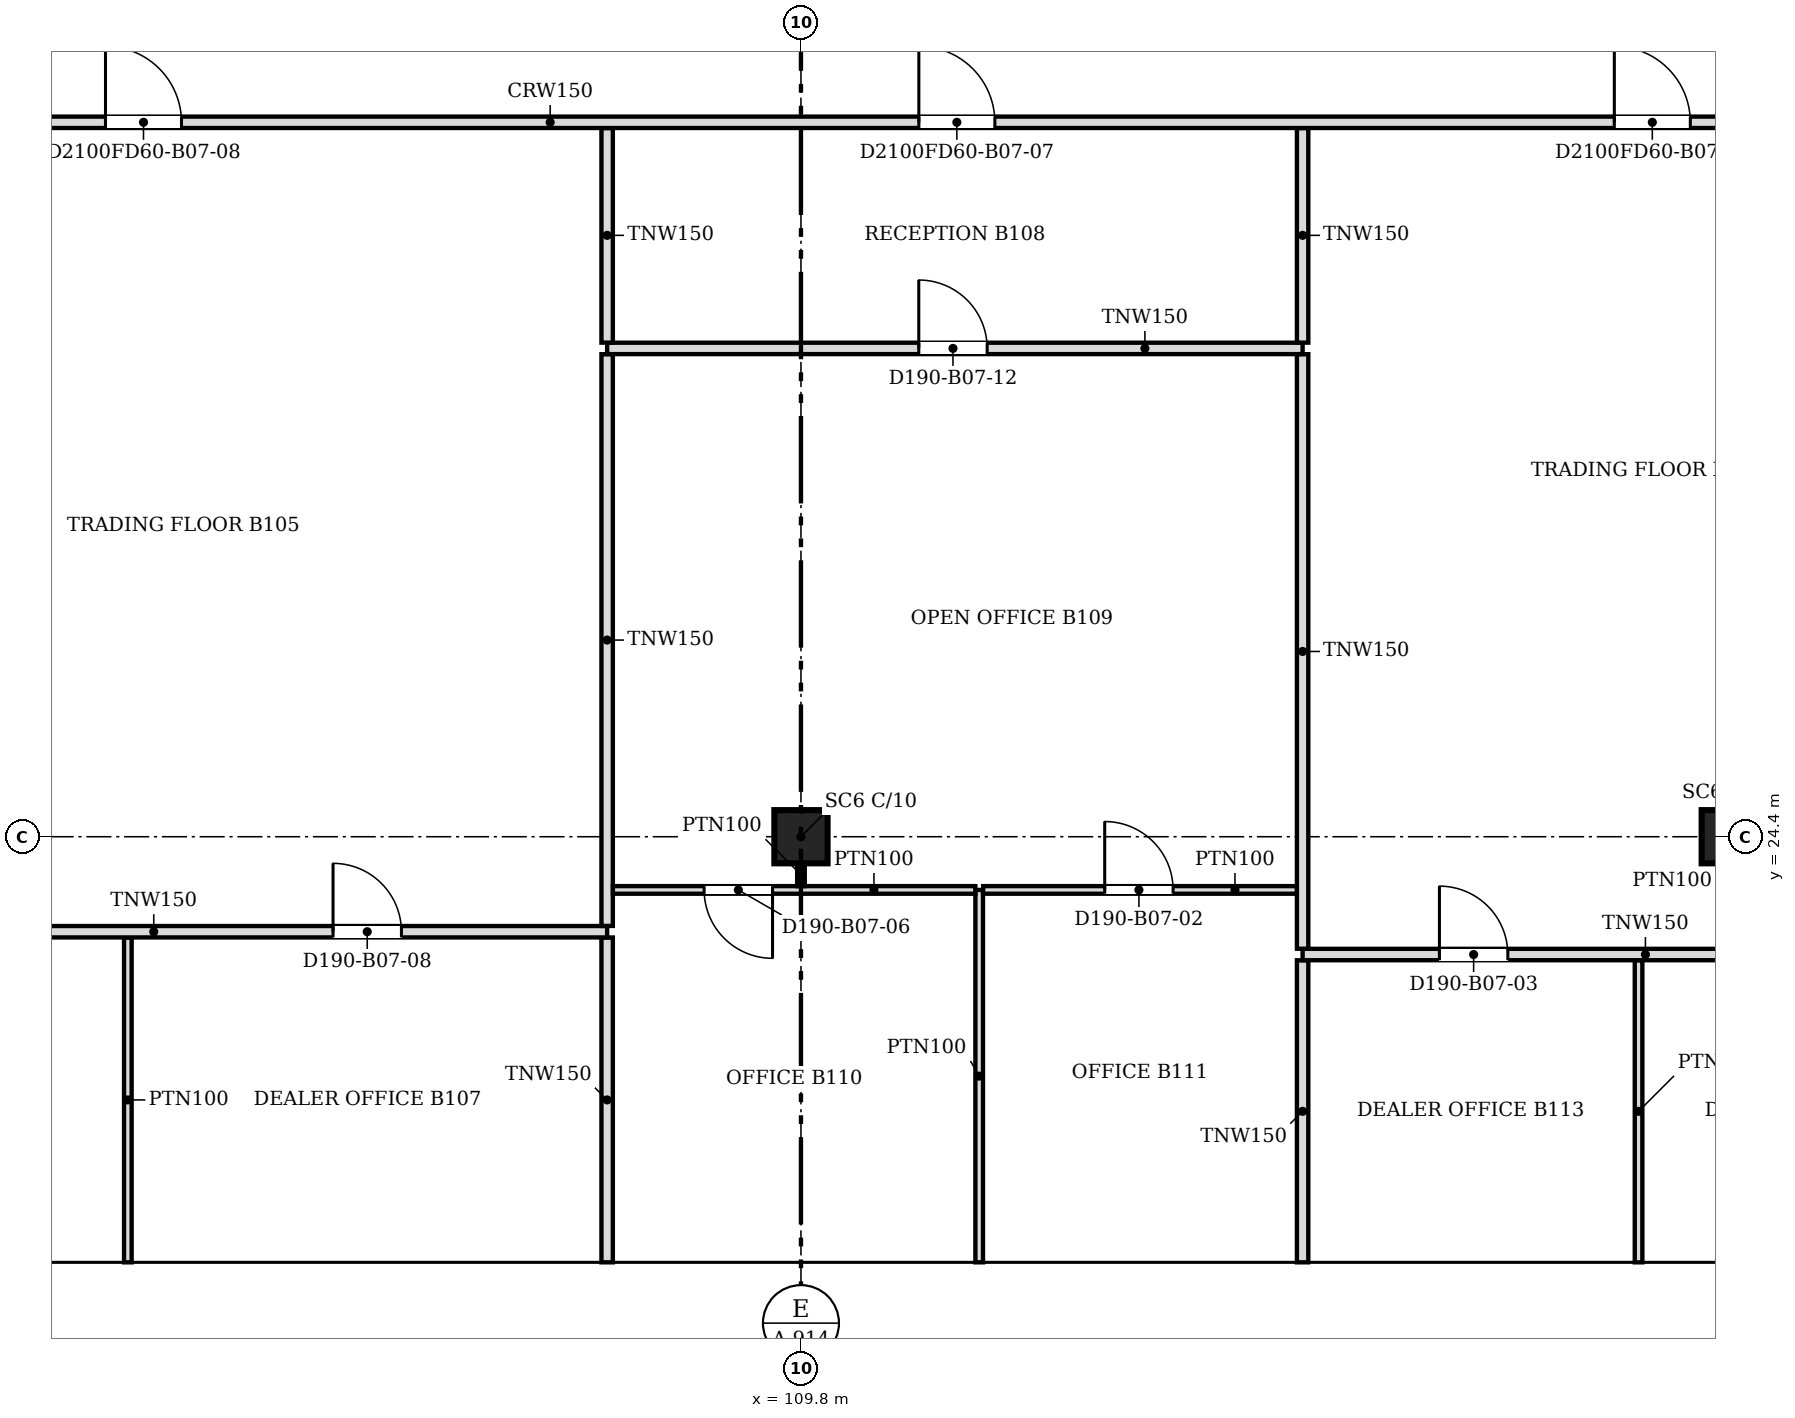
"""IFC4 building model, lengths in metres.
Left out: names, types, materials, properties, quantities, classifications, styles, units other than length and angle.
Written with IfcOpenShell. Run it as: python <this file> out.ifc"""

import sys

from ifc_helpers import new_model, si_unit, direction, frame, frame_2d, origin, origin_2d, place, context, subcontext, project, spatial, polyline, rectangle, outline, extrude, faceted_brep, source, transform, mapped, element, fill, save


model = new_model("IFC4")
c1 = context("Model", 3, precision=1e-05, world=origin(), true_north=direction((0.0, 1.0)))
c2 = subcontext(c1, "Body", "Model", "MODEL_VIEW")
j1 = project(units=[si_unit("LENGTHUNIT", "METRE"), si_unit("PLANEANGLEUNIT", "RADIAN")], contexts=[c1])
p1 = place(None, origin())
s1 = spatial("IfcSite", under=j1, at=p1, CompositionType="ELEMENT")
p2 = place(p1, origin())
s2 = spatial("IfcBuilding", under=s1, at=p2, CompositionType="ELEMENT")
p3 = place(p2, frame((0.0, 0.0, 72.4)))
s3 = spatial("IfcBuildingStorey", under=s2, at=p3, CompositionType="ELEMENT", Elevation=72.4)
for number, where, z_axis, x_axis in (
    (1, (109.8, 24.4, 0.0), (0.0, 0.0, 1.0), (1.0, 0.0, 0.0)),
    (2, (122.0, 24.4, 0.0), (0.0, 0.0, 1.0), (1.0, 0.0, 0.0)),
):
    element("IfcColumn", number, at=place(p3, frame(where, z_axis=z_axis, x_axis=x_axis)), inside=s3, PredefinedType="COLUMN", context=c2, shape_type="SweptSolid", body=[
        extrude(rectangle(XDim=0.7, YDim=0.7, at=origin_2d()), origin(), (0.0, 0.0, 1.0), 3.6),
    ])
m1 = source(origin(), c2, "Body", "Brep", [
    faceted_brep([(3.05, -0.25, 0.0), (6.1, -0.25, 3.8), (6.1, -0.25, 3.8), (3.05, -0.25, 7.6), (0.0, -0.25, 3.8), (0.0, 0.25, 3.8), (3.05, 0.25, 7.6), (6.1, 0.25, 3.8), (6.1, 0.25, 3.8), (3.05, 0.25, 0.0)], [[[0, 1, 2, 3, 4]], [[5, 6, 7, 8, 9]], [[9, 8, 1, 0]], [[7, 6, 3, 2]], [[6, 5, 4, 3]], [[5, 9, 0, 4]], [[1, 8, 7, 2]]]),
])
p4 = place(p3, frame((97.6, 18.55, -3.8), z_axis=(0.0, 0.0, 1.0), x_axis=(1.0, 0.0, 0.0)))
e3 = element("IfcWall", 3, at=p4, inside=s3, PredefinedType="SOLIDWALL", context=c2, shape_type="MappedRepresentation", body=[
    mapped(m1, transform((0.0, 0.0, 0.0), scale=1.0)),
])
m2 = source(origin(), c2, "Body", "SweptSolid", [
    extrude(outline(polyline([(3.05, 0.399), (5.78, 3.8), (3.05, 7.2), (0.321, 3.8), (3.05, 0.399)])), frame((0.0, 0.26, 0.0), z_axis=(0.0, -1.0, 0.0), x_axis=(1.0, 0.0, 0.0)), (0.0, 0.0, 1.0), 0.52),
])
p5 = place(p4, origin())
e4 = element("IfcOpeningElement", 4, at=p5, cuts=e3, PredefinedType="OPENING", context=c2, shape_type="MappedRepresentation", body=[
    mapped(m2, transform((0.0, 0.0, 0.0), scale=1.0)),
])
m3 = source(origin(), c2, "Body", "SweptSolid", [
    extrude(outline(polyline([(3.05, 0.0), (6.1, 3.8), (3.05, 7.6), (0.0, 3.8), (3.05, 0.0)])), frame((0.0, 0.25, 0.0), z_axis=(0.0, -1.0, 0.0), x_axis=(1.0, 0.0, 0.0)), (0.0, 0.0, 1.0), 0.5),
])
p6 = place(p3, frame((103.7, 18.55, -3.8), z_axis=(0.0, 0.0, 1.0), x_axis=(1.0, 0.0, 0.0)))
e5 = element("IfcWall", 5, at=p6, inside=s3, PredefinedType="SOLIDWALL", context=c2, shape_type="MappedRepresentation", body=[
    mapped(m3, transform((0.0, 0.0, 0.0), scale=1.0)),
])
p7 = place(p6, origin())
e6 = element("IfcOpeningElement", 6, at=p7, cuts=e5, PredefinedType="OPENING", context=c2, shape_type="MappedRepresentation", body=[
    mapped(m2, transform((0.0, 0.0, 0.0), scale=1.0)),
])
p8 = place(p3, frame((109.8, 18.55, -3.8), z_axis=(0.0, 0.0, 1.0), x_axis=(1.0, 0.0, 0.0)))
e7 = element("IfcWall", 7, at=p8, inside=s3, PredefinedType="SOLIDWALL", context=c2, shape_type="MappedRepresentation", body=[
    mapped(m1, transform((0.0, 0.0, 0.0), scale=1.0)),
])
p9 = place(p8, origin())
e8 = element("IfcOpeningElement", 8, at=p9, cuts=e7, PredefinedType="OPENING", context=c2, shape_type="MappedRepresentation", body=[
    mapped(m2, transform((0.0, 0.0, 0.0), scale=1.0)),
])
p10 = place(p3, frame((115.9, 18.55, -3.8), z_axis=(0.0, 0.0, 1.0), x_axis=(1.0, 0.0, 0.0)))
e9 = element("IfcWall", 9, at=p10, inside=s3, PredefinedType="SOLIDWALL", context=c2, shape_type="MappedRepresentation", body=[
    mapped(m3, transform((0.0, 0.0, 0.0), scale=1.0)),
])
p11 = place(p10, origin())
e10 = element("IfcOpeningElement", 10, at=p11, cuts=e9, PredefinedType="OPENING", context=c2, shape_type="MappedRepresentation", body=[
    mapped(m2, transform((0.0, 0.0, 0.0), scale=1.0)),
])
p12 = place(p2, frame((0.0, 0.0, 76.2)))
s4 = spatial("IfcBuildingStorey", under=s2, at=p12, CompositionType="ELEMENT", Elevation=76.2)
m4 = source(origin(), c2, "Body", "Brep", [
    faceted_brep([(3.05, -0.25, 0.0), (6.1, -0.25, 3.8), (6.1, -0.25, 3.8), (3.05, -0.25, 7.6), (0.0, -0.25, 3.8), (0.0, 0.25, 3.8), (3.05, 0.25, 7.6), (6.1, 0.25, 3.8), (6.1, 0.25, 3.8), (3.05, 0.25, 0.0)], [[[0, 1, 2, 3, 4]], [[5, 6, 7, 8, 9]], [[9, 8, 1, 0]], [[7, 6, 3, 2]], [[6, 5, 4, 3]], [[5, 9, 0, 4]], [[1, 8, 7, 2]]]),
])
p13 = place(p12, frame((94.55, 18.55, -3.8), z_axis=(0.0, 0.0, 1.0), x_axis=(1.0, 0.0, 0.0)))
e11 = element("IfcWall", 11, at=p13, inside=s4, PredefinedType="SOLIDWALL", context=c2, shape_type="MappedRepresentation", body=[
    mapped(m4, transform((0.0, 0.0, 0.0), scale=1.0)),
])
m5 = source(origin(), c2, "Body", "SweptSolid", [
    extrude(outline(polyline([(3.05, 0.399), (5.78, 3.8), (3.05, 7.201), (0.321, 3.8), (3.05, 0.399)])), frame((0.0, 0.26, 0.0), z_axis=(0.0, -1.0, 0.0), x_axis=(1.0, 0.0, 0.0)), (0.0, 0.0, 1.0), 0.52),
])
p14 = place(p13, origin())
e12 = element("IfcOpeningElement", 12, at=p14, cuts=e11, PredefinedType="OPENING", context=c2, shape_type="MappedRepresentation", body=[
    mapped(m5, transform((0.0, 0.0, 0.0), scale=1.0)),
])
m6 = source(origin(), c2, "Body", "SweptSolid", [
    extrude(outline(polyline([(3.05, 0.0), (6.1, 3.8), (3.05, 7.6), (0.0, 3.8), (3.05, 0.0)])), frame((0.0, 0.25, 0.0), z_axis=(0.0, -1.0, 0.0), x_axis=(1.0, 0.0, 0.0)), (0.0, 0.0, 1.0), 0.5),
])
p15 = place(p12, frame((100.65, 18.55, -3.8), z_axis=(0.0, 0.0, 1.0), x_axis=(1.0, 0.0, 0.0)))
e13 = element("IfcWall", 13, at=p15, inside=s4, PredefinedType="SOLIDWALL", context=c2, shape_type="MappedRepresentation", body=[
    mapped(m6, transform((0.0, 0.0, 0.0), scale=1.0)),
])
p16 = place(p15, origin())
e14 = element("IfcOpeningElement", 14, at=p16, cuts=e13, PredefinedType="OPENING", context=c2, shape_type="MappedRepresentation", body=[
    mapped(m5, transform((0.0, 0.0, 0.0), scale=1.0)),
])
p17 = place(p12, frame((106.75, 18.55, -3.8), z_axis=(0.0, 0.0, 1.0), x_axis=(1.0, 0.0, 0.0)))
e15 = element("IfcWall", 15, at=p17, inside=s4, PredefinedType="SOLIDWALL", context=c2, shape_type="MappedRepresentation", body=[
    mapped(m6, transform((0.0, 0.0, 0.0), scale=1.0)),
])
p18 = place(p17, origin())
e16 = element("IfcOpeningElement", 16, at=p18, cuts=e15, PredefinedType="OPENING", context=c2, shape_type="MappedRepresentation", body=[
    mapped(m5, transform((0.0, 0.0, 0.0), scale=1.0)),
])
p19 = place(p12, frame((112.85, 18.55, -3.8), z_axis=(0.0, 0.0, 1.0), x_axis=(1.0, 0.0, 0.0)))
e17 = element("IfcWall", 17, at=p19, inside=s4, PredefinedType="SOLIDWALL", context=c2, shape_type="MappedRepresentation", body=[
    mapped(m4, transform((0.0, 0.0, 0.0), scale=1.0)),
])
p20 = place(p19, origin())
e18 = element("IfcOpeningElement", 18, at=p20, cuts=e17, PredefinedType="OPENING", context=c2, shape_type="MappedRepresentation", body=[
    mapped(m5, transform((0.0, 0.0, 0.0), scale=1.0)),
])
p21 = place(p12, frame((118.95, 18.55, -3.8), z_axis=(0.0, 0.0, 1.0), x_axis=(1.0, 0.0, 0.0)))
e19 = element("IfcWall", 19, at=p21, inside=s4, PredefinedType="SOLIDWALL", context=c2, shape_type="MappedRepresentation", body=[
    mapped(m6, transform((0.0, 0.0, 0.0), scale=1.0)),
])
p22 = place(p21, origin())
e20 = element("IfcOpeningElement", 20, at=p22, cuts=e19, PredefinedType="OPENING", context=c2, shape_type="MappedRepresentation", body=[
    mapped(m5, transform((0.0, 0.0, 0.0), scale=1.0)),
])
p23 = place(p3, frame((100.944, 18.8, 0.0), z_axis=(0.0, 0.0, 1.0), x_axis=(0.0, 1.0, 0.0)))
e21 = element("IfcWall", 21, at=p23, inside=s3, PredefinedType="PARTITIONING", context=c2, shape_type="SweptSolid", body=[
    extrude(rectangle(XDim=4.274, YDim=0.1, at=frame_2d((2.137, 0.0))), origin(), (0.0, 0.0, 1.0), 3.067),
])
p24 = place(p3, frame((107.25, 18.8, 0.0), z_axis=(0.0, 0.0, 1.0), x_axis=(0.0, 1.0, 0.0)))
e22 = element("IfcWall", 22, at=p24, inside=s3, PredefinedType="PARTITIONING", context=c2, shape_type="SweptSolid", body=[
    extrude(rectangle(XDim=4.274, YDim=0.15, at=frame_2d((2.137, 0.0))), origin(), (0.0, 0.0, 1.0), 3.067),
])
p25 = place(p3, frame((112.145, 18.8, 0.0), z_axis=(0.0, 0.0, 1.0), x_axis=(0.0, 1.0, 0.0)))
e23 = element("IfcWall", 23, at=p25, inside=s3, PredefinedType="PARTITIONING", context=c2, shape_type="SweptSolid", body=[
    extrude(rectangle(XDim=4.9, YDim=0.1, at=frame_2d((2.45, 0.0))), origin(), (0.0, 0.0, 1.0), 3.067),
])
p26 = place(p3, frame((116.4, 18.8, 0.0), z_axis=(0.0, 0.0, 1.0), x_axis=(0.0, 1.0, 0.0)))
e24 = element("IfcWall", 24, at=p26, inside=s3, PredefinedType="PARTITIONING", context=c2, shape_type="SweptSolid", body=[
    extrude(rectangle(XDim=3.974, YDim=0.15, at=frame_2d((1.987, 0.0))), origin(), (0.0, 0.0, 1.0), 3.067),
])
p27 = place(p3, frame((120.82, 18.8, 0.0), z_axis=(0.0, 0.0, 1.0), x_axis=(0.0, 1.0, 0.0)))
e25 = element("IfcWall", 25, at=p27, inside=s3, PredefinedType="PARTITIONING", context=c2, shape_type="SweptSolid", body=[
    extrude(rectangle(XDim=3.974, YDim=0.1, at=frame_2d((1.987, 0.0))), origin(), (0.0, 0.0, 1.0), 3.067),
])
p28 = place(p3, frame((125.55, 22.85, 0.0), z_axis=(0.0, 0.0, 1.0), x_axis=(-1.0, 0.0, 0.0)))
e26 = element("IfcWall", 26, at=p28, inside=s3, PredefinedType="PARTITIONING", context=c2, shape_type="SweptSolid", body=[
    extrude(rectangle(XDim=9.15, YDim=0.15, at=frame_2d((4.575, 0.0))), origin(), (0.0, 0.0, 1.0), 3.067),
])
m7 = source(origin(), c2, "Body", "SweptSolid", [
    extrude(rectangle(XDim=0.9, YDim=2.1, at=frame_2d((0.45, 1.05))), frame((0.0, 0.085, 0.0), z_axis=(0.0, -1.0, 0.0), x_axis=(1.0, 0.0, 0.0)), (0.0, 0.0, 1.0), 0.17),
])
p29 = place(p28, frame((6.45, 0.0, 0.0)))
e27 = element("IfcOpeningElement", 27, at=p29, cuts=e26, PredefinedType="OPENING", context=c2, shape_type="MappedRepresentation", body=[
    mapped(m7, transform((0.0, 0.0, 0.0), scale=1.0)),
])
p30 = place(p28, frame((1.93, 0.0, 0.0)))
e28 = element("IfcOpeningElement", 28, at=p30, cuts=e26, PredefinedType="OPENING", context=c2, shape_type="MappedRepresentation", body=[
    mapped(m7, transform((0.0, 0.0, 0.0), scale=1.0)),
])
p31 = place(p3, frame((116.4, 22.926, 0.0), z_axis=(0.0, 0.0, 1.0), x_axis=(0.0, 1.0, 0.0)))
e29 = element("IfcWall", 29, at=p31, inside=s3, PredefinedType="PARTITIONING", context=c2, shape_type="SweptSolid", body=[
    extrude(rectangle(XDim=7.823, YDim=0.15, at=frame_2d((3.912, 0.0))), origin(), (0.0, 0.0, 1.0), 3.067),
])
p32 = place(p3, frame((107.25, 23.15, 0.0), z_axis=(0.0, 0.0, 1.0), x_axis=(-1.0, 0.0, 0.0)))
e30 = element("IfcWall", 30, at=p32, inside=s3, PredefinedType="PARTITIONING", context=c2, shape_type="SweptSolid", body=[
    extrude(rectangle(XDim=12.124, YDim=0.15, at=frame_2d((6.062, 0.0))), origin(), (0.0, 0.0, 1.0), 3.067),
])
p33 = place(p32, frame((8.324, 0.0, 0.0)))
e31 = element("IfcOpeningElement", 31, at=p33, cuts=e30, PredefinedType="OPENING", context=c2, shape_type="MappedRepresentation", body=[
    mapped(m7, transform((0.0, 0.0, 0.0), scale=1.0)),
])
p34 = place(p32, frame((2.706, 0.0, 0.0)))
e32 = element("IfcOpeningElement", 32, at=p34, cuts=e30, PredefinedType="OPENING", context=c2, shape_type="MappedRepresentation", body=[
    mapped(m7, transform((0.0, 0.0, 0.0), scale=1.0)),
])
p35 = place(p3, frame((107.25, 23.226, 0.0), z_axis=(0.0, 0.0, 1.0), x_axis=(0.0, 1.0, 0.0)))
e33 = element("IfcWall", 33, at=p35, inside=s3, PredefinedType="PARTITIONING", context=c2, shape_type="SweptSolid", body=[
    extrude(rectangle(XDim=7.523, YDim=0.15, at=frame_2d((3.761, 0.0))), origin(), (0.0, 0.0, 1.0), 3.067),
])
p36 = place(p3, frame((112.094, 23.7, 0.0), z_axis=(0.0, 0.0, 1.0), x_axis=(-1.0, 0.0, 0.0)))
e34 = element("IfcWall", 34, at=p36, inside=s3, PredefinedType="PARTITIONING", context=c2, shape_type="SweptSolid", body=[
    extrude(rectangle(XDim=4.768, YDim=0.1, at=frame_2d((2.384, 0.0))), origin(), (0.0, 0.0, 1.0), 3.067),
])
m8 = source(origin(), c2, "Body", "SweptSolid", [
    extrude(rectangle(XDim=0.9, YDim=2.1, at=frame_2d((0.45, 1.05))), frame((0.0, 0.06, 0.0), z_axis=(0.0, -1.0, 0.0), x_axis=(1.0, 0.0, 0.0)), (0.0, 0.0, 1.0), 0.12),
])
p37 = place(p36, frame((2.668, 0.0, 0.0)))
e35 = element("IfcOpeningElement", 35, at=p37, cuts=e34, PredefinedType="OPENING", context=c2, shape_type="MappedRepresentation", body=[
    mapped(m8, transform((0.0, 0.0, 0.0), scale=1.0)),
])
p38 = place(p3, frame((116.324, 23.7, 0.0), z_axis=(0.0, 0.0, 1.0), x_axis=(-1.0, 0.0, 0.0)))
e36 = element("IfcWall", 36, at=p38, inside=s3, PredefinedType="PARTITIONING", context=c2, shape_type="SweptSolid", body=[
    extrude(rectangle(XDim=4.128, YDim=0.1, at=frame_2d((2.064, 0.0))), origin(), (0.0, 0.0, 1.0), 3.067),
])
p39 = place(p38, frame((1.628, 0.0, 0.0)))
e37 = element("IfcOpeningElement", 37, at=p39, cuts=e36, PredefinedType="OPENING", context=c2, shape_type="MappedRepresentation", body=[
    mapped(m8, transform((0.0, 0.0, 0.0), scale=1.0)),
])
p40 = place(p3, frame((109.8, 24.05, 0.0), z_axis=(0.0, 0.0, 1.0), x_axis=(0.0, -1.0, 0.0)))
e38 = element("IfcWall", 38, at=p40, inside=s3, PredefinedType="PARTITIONING", context=c2, shape_type="SweptSolid", body=[
    extrude(rectangle(XDim=0.3, YDim=0.1, at=frame_2d((0.15, 0.0))), origin(), (0.0, 0.0, 1.0), 3.067),
])
p41 = place(p3, frame((116.4, 30.825, 0.0), z_axis=(0.0, 0.0, 1.0), x_axis=(-1.0, 0.0, 0.0)))
e39 = element("IfcWall", 39, at=p41, inside=s3, PredefinedType="PARTITIONING", context=c2, shape_type="SweptSolid", body=[
    extrude(rectangle(XDim=9.15, YDim=0.15, at=frame_2d((4.575, 0.0))), origin(), (0.0, 0.0, 1.0), 3.067),
])
p42 = place(p41, frame((4.15, 0.0, 0.0)))
e40 = element("IfcOpeningElement", 40, at=p42, cuts=e39, PredefinedType="OPENING", context=c2, shape_type="MappedRepresentation", body=[
    mapped(m7, transform((0.0, 0.0, 0.0), scale=1.0)),
])
for number, where, z_axis, x_axis in (
    (41, (107.25, 30.901, 0.0), (0.0, 0.0, 1.0), (0.0, 1.0, 0.0)),
    (42, (116.4, 30.901, 0.0), (0.0, 0.0, 1.0), (0.0, 1.0, 0.0)),
):
    element("IfcWall", number, at=place(p3, frame(where, z_axis=z_axis, x_axis=x_axis)), inside=s3, PredefinedType="PARTITIONING", context=c2, shape_type="SweptSolid", body=[
        extrude(rectangle(XDim=2.823, YDim=0.15, at=frame_2d((1.412, 0.0))), origin(), (0.0, 0.0, 1.0), 3.067),
    ])
p43 = place(p3, frame((133.7, 33.8, 0.0), z_axis=(0.0, 0.0, 1.0), x_axis=(-1.0, 0.0, 0.0)))
e43 = element("IfcWall", 43, at=p43, inside=s3, PredefinedType="PARTITIONING", context=c2, shape_type="SweptSolid", body=[
    extrude(rectangle(XDim=47.8, YDim=0.15, at=frame_2d((23.9, 0.0))), origin(), (0.0, 0.0, 1.0), 3.067),
])
m9 = source(origin(), c2, "Body", "SweptSolid", [
    extrude(rectangle(XDim=1.0, YDim=2.1, at=frame_2d((0.5, 1.05))), frame((0.0, 0.085, 0.0), z_axis=(0.0, -1.0, 0.0), x_axis=(1.0, 0.0, 0.0)), (0.0, 0.0, 1.0), 0.17),
])
p44 = place(p43, frame((3.549, 0.0, 0.0)))
e44 = element("IfcOpeningElement", 44, at=p44, cuts=e43, PredefinedType="OPENING", context=c2, shape_type="MappedRepresentation", body=[
    mapped(m9, transform((0.0, 0.0, 0.0), scale=1.0)),
])
p45 = place(p43, frame((42.7, 0.0, 0.0)))
e45 = element("IfcOpeningElement", 45, at=p45, cuts=e43, PredefinedType="OPENING", context=c2, shape_type="MappedRepresentation", body=[
    mapped(m9, transform((0.0, 0.0, 0.0), scale=1.0)),
])
p46 = place(p43, frame((12.199, 0.0, 0.0)))
e46 = element("IfcOpeningElement", 46, at=p46, cuts=e43, PredefinedType="OPENING", context=c2, shape_type="MappedRepresentation", body=[
    mapped(m9, transform((0.0, 0.0, 0.0), scale=1.0)),
])
p47 = place(p43, frame((21.349, 0.0, 0.0)))
e47 = element("IfcOpeningElement", 47, at=p47, cuts=e43, PredefinedType="OPENING", context=c2, shape_type="MappedRepresentation", body=[
    mapped(m9, transform((0.0, 0.0, 0.0), scale=1.0)),
])
p48 = place(p43, frame((32.05, 0.0, 0.0)))
e48 = element("IfcOpeningElement", 48, at=p48, cuts=e43, PredefinedType="OPENING", context=c2, shape_type="MappedRepresentation", body=[
    mapped(m9, transform((0.0, 0.0, 0.0), scale=1.0)),
])
m10 = source(origin(), c2, "Body", "SweptSolid", [
    extrude(rectangle(XDim=0.9, YDim=2.1, at=frame_2d((0.45, 1.05))), frame((0.0, 0.025, 0.0), z_axis=(0.0, -1.0, 0.0), x_axis=(1.0, 0.0, 0.0)), (0.0, 0.0, 1.0), 0.05),
])
p49 = place(p39, origin())
e49 = element("IfcDoor", 49, at=p49, inside=s3, OperationType="SINGLE_SWING_RIGHT", PredefinedType="DOOR", context=c2, shape_type="MappedRepresentation", body=[
    mapped(m10, transform((0.0, 0.0, 0.0), scale=1.0)),
])
fill(e37, e49)
p50 = place(p29, origin())
e50 = element("IfcDoor", 50, at=p50, inside=s3, OperationType="SINGLE_SWING_RIGHT", PredefinedType="DOOR", context=c2, shape_type="MappedRepresentation", body=[
    mapped(m10, transform((0.0, 0.0, 0.0), scale=1.0)),
])
fill(e27, e50)
p51 = place(p37, origin())
e51 = element("IfcDoor", 51, at=p51, inside=s3, OperationType="SINGLE_SWING_LEFT", PredefinedType="DOOR", context=c2, shape_type="MappedRepresentation", body=[
    mapped(m10, transform((0.0, 0.0, 0.0), scale=1.0)),
])
fill(e35, e51)
p52 = place(p34, origin())
e52 = element("IfcDoor", 52, at=p52, inside=s3, OperationType="SINGLE_SWING_RIGHT", PredefinedType="DOOR", context=c2, shape_type="MappedRepresentation", body=[
    mapped(m10, transform((0.0, 0.0, 0.0), scale=1.0)),
])
fill(e32, e52)
m11 = source(origin(), c2, "Body", "SweptSolid", [
    extrude(rectangle(XDim=1.0, YDim=2.1, at=frame_2d((0.5, 1.05))), frame((0.0, 0.025, 0.0), z_axis=(0.0, -1.0, 0.0), x_axis=(1.0, 0.0, 0.0)), (0.0, 0.0, 1.0), 0.05),
])
p53 = place(p46, origin())
e53 = element("IfcDoor", 53, at=p53, inside=s3, OperationType="SINGLE_SWING_RIGHT", PredefinedType="DOOR", context=c2, shape_type="MappedRepresentation", body=[
    mapped(m11, transform((0.0, 0.0, 0.0), scale=1.0)),
])
fill(e46, e53)
p54 = place(p47, origin())
e54 = element("IfcDoor", 54, at=p54, inside=s3, OperationType="SINGLE_SWING_RIGHT", PredefinedType="DOOR", context=c2, shape_type="MappedRepresentation", body=[
    mapped(m11, transform((0.0, 0.0, 0.0), scale=1.0)),
])
fill(e47, e54)
p55 = place(p42, origin())
e55 = element("IfcDoor", 55, at=p55, inside=s3, OperationType="SINGLE_SWING_RIGHT", PredefinedType="DOOR", context=c2, shape_type="MappedRepresentation", body=[
    mapped(m10, transform((0.0, 0.0, 0.0), scale=1.0)),
])
fill(e40, e55)
p56 = place(p48, origin())
e56 = element("IfcDoor", 56, at=p56, inside=s3, OperationType="SINGLE_SWING_RIGHT", PredefinedType="DOOR", context=c2, shape_type="MappedRepresentation", body=[
    mapped(m11, transform((0.0, 0.0, 0.0), scale=1.0)),
])
fill(e48, e56)
save(model, sys.argv[1])
